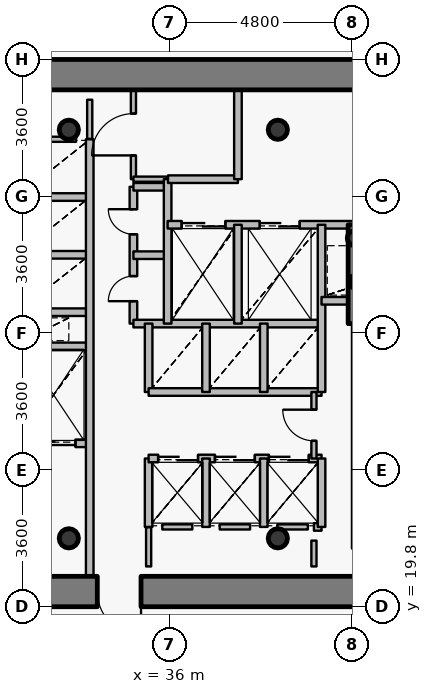
"""IFC4 building model, lengths in metres.
Left out: names, types, materials, properties, quantities, classifications, styles, units other than length and angle.
Written with IfcOpenShell. Run it as: python <this file> out.ifc"""

import sys

from ifc_helpers import new_model, si_unit, direction, frame, frame_2d, origin, origin_2d, place, context, subcontext, project, spatial, rectangle, hollow_circle, extrude, source, transform, mapped, element, fill, save


model = new_model("IFC4")
c1 = context("Model", 3, precision=1e-05, world=origin(), true_north=direction((0.0, 1.0)))
c2 = subcontext(c1, "Body", "Model", "MODEL_VIEW")
j1 = project(units=[si_unit("LENGTHUNIT", "METRE"), si_unit("PLANEANGLEUNIT", "RADIAN")], contexts=[c1])
p1 = place(None, origin())
s1 = spatial("IfcSite", under=j1, at=p1, CompositionType="ELEMENT")
p2 = place(p1, origin())
s2 = spatial("IfcBuilding", under=s1, at=p2, CompositionType="ELEMENT")
p3 = place(p2, frame((0.0, 0.0, 112.2)))
s3 = spatial("IfcBuildingStorey", under=s2, at=p3, CompositionType="ELEMENT", Elevation=112.2)
for number, where, z_axis, x_axis in (
    (1, (33.35, 21.6, 0.0), (0.0, 0.0, 1.0), (1.0, 0.0, 0.0)),
    (2, (38.85, 21.6, 0.0), (0.0, 0.0, 1.0), (1.0, 0.0, 0.0)),
    (3, (38.85, 32.35, 0.0), (0.0, 0.0, 1.0), (1.0, 0.0, 0.0)),
    (4, (33.35, 32.35, 0.0), (0.0, 0.0, 1.0), (1.0, 0.0, 0.0)),
):
    element("IfcColumn", number, at=place(p3, frame(where, z_axis=z_axis, x_axis=x_axis)), inside=s3, PredefinedType="COLUMN", context=c2, shape_type="SweptSolid", body=[
        extrude(hollow_circle(Radius=0.254, WallThickness=0.02, at=origin_2d()), origin(), (0.0, 0.0, 1.0), 3.75),
    ])
for number, where, z_axis, x_axis in (
    (5, (40.95, 28.35, 0.0), (0.0, 0.0, 1.0), (1.0, 0.0, 0.0)),
    (6, (40.88, 29.5, 0.0), (0.0, 0.0, 1.0), (1.0, 0.0, 0.0)),
):
    element("IfcColumn", number, at=place(p3, frame(where, z_axis=z_axis, x_axis=x_axis)), inside=s3, PredefinedType="COLUMN", context=c2, shape_type="SweptSolid", body=[
        extrude(hollow_circle(Radius=0.203, WallThickness=0.016, at=origin_2d()), origin(), (0.0, 0.0, 1.0), 3.75),
    ])
p4 = place(p3, frame((26.6, 33.8, 0.0), z_axis=(0.0, 0.0, 1.0), x_axis=(1.0, 0.0, 0.0)))
e7 = element("IfcWall", 7, at=p4, inside=s3, PredefinedType="SHEAR", context=c2, shape_type="SweptSolid", body=[
    extrude(rectangle(XDim=18.8, YDim=0.8, at=frame_2d((9.4, 0.0))), origin(), (0.0, 0.0, 1.0), 2.95),
])
p5 = place(p3, frame((45.4, 20.2, 0.0), z_axis=(0.0, 0.0, 1.0), x_axis=(-1.0, 0.0, 0.0)))
e8 = element("IfcWall", 8, at=p5, inside=s3, PredefinedType="SHEAR", context=c2, shape_type="SweptSolid", body=[
    extrude(rectangle(XDim=18.8, YDim=0.8, at=frame_2d((9.4, 0.0))), origin(), (0.0, 0.0, 1.0), 2.95),
])
p6 = place(p5, frame((10.15, 0.0, 0.0)))
e9 = element("IfcOpeningElement", 9, at=p6, cuts=e8, PredefinedType="OPENING", context=c2, shape_type="SweptSolid", body=[
    extrude(rectangle(XDim=1.15, YDim=2.15, at=origin_2d()), frame((0.575, 0.41, 1.075), z_axis=(0.0, -1.0, 0.0), x_axis=(1.0, 0.0, 0.0)), (0.0, 0.0, 1.0), 0.82),
])
p7 = place(p3, frame((40.9, 27.25, 0.0), z_axis=(0.0, 0.0, 1.0), x_axis=(0.0, 1.0, 0.0)))
e10 = element("IfcWall", 10, at=p7, inside=s3, PredefinedType="SHEAR", context=c2, shape_type="SweptSolid", body=[
    extrude(rectangle(XDim=2.6, YDim=0.4, at=frame_2d((1.3, 0.0))), origin(), (0.0, 0.0, 1.0), 3.1),
])
p8 = place(p3, frame((32.0, 24.1, 0.0), z_axis=(0.0, 0.0, 1.0), x_axis=(1.0, 0.0, 0.0)))
e11 = element("IfcWall", 11, at=p8, inside=s3, PredefinedType="PARTITIONING", context=c2, shape_type="SweptSolid", body=[
    extrude(rectangle(XDim=1.9, YDim=0.2, at=frame_2d((0.95, 0.0))), origin(), (0.0, 0.0, 1.0), 3.085),
])
p9 = place(p8, frame((0.375, 0.0, 0.0)))
e12 = element("IfcOpeningElement", 12, at=p9, cuts=e11, PredefinedType="OPENING", context=c2, shape_type="SweptSolid", body=[
    extrude(rectangle(XDim=1.15, YDim=2.15, at=origin_2d()), frame((0.575, 0.11, 1.075), z_axis=(0.0, -1.0, 0.0), x_axis=(1.0, 0.0, 0.0)), (0.0, 0.0, 1.0), 0.22),
])
for number, where, z_axis, x_axis in (
    (13, (32.0, 26.65, 0.0), (0.0, 0.0, 1.0), (1.0, 0.0, 0.0)),
    (14, (32.0, 27.55, 0.0), (0.0, 0.0, 1.0), (1.0, 0.0, 0.0)),
    (15, (32.0, 29.06, 0.0), (0.0, 0.0, 1.0), (1.0, 0.0, 0.0)),
    (16, (32.0, 30.58, 0.0), (0.0, 0.0, 1.0), (1.0, 0.0, 0.0)),
):
    element("IfcWall", number, at=place(p3, frame(where, z_axis=z_axis, x_axis=x_axis)), inside=s3, PredefinedType="PARTITIONING", context=c2, shape_type="SweptSolid", body=[
        extrude(rectangle(XDim=1.9, YDim=0.2, at=frame_2d((0.95, 0.0))), origin(), (0.0, 0.0, 1.0), 3.085),
    ])
p10 = place(p3, frame((33.9, 20.6, 0.0), z_axis=(0.0, 0.0, 1.0), x_axis=(0.0, 1.0, 0.0)))
e17 = element("IfcWall", 17, at=p10, inside=s3, PredefinedType="PARTITIONING", context=c2, shape_type="SweptSolid", body=[
    extrude(rectangle(XDim=11.5, YDim=0.2, at=frame_2d((5.75, 0.0))), origin(), (0.0, 0.0, 1.0), 3.085),
])
p11 = place(p3, frame((35.05, 27.25, 0.0), z_axis=(0.0, 0.0, 1.0), x_axis=(0.0, 1.0, 0.0)))
e18 = element("IfcWall", 18, at=p11, inside=s3, PredefinedType="PARTITIONING", context=c2, shape_type="SweptSolid", body=[
    extrude(rectangle(XDim=3.6, YDim=0.2, at=frame_2d((1.8, 0.0))), origin(), (0.0, 0.0, 1.0), 3.5),
])
p12 = place(p11, frame((0.59, 0.0, 0.0)))
e19 = element("IfcOpeningElement", 19, at=p12, cuts=e18, PredefinedType="OPENING", context=c2, shape_type="SweptSolid", body=[
    extrude(rectangle(XDim=0.66, YDim=2.05, at=origin_2d()), frame((0.33, 0.11, 1.025), z_axis=(0.0, -1.0, 0.0), x_axis=(1.0, 0.0, 0.0)), (0.0, 0.0, 1.0), 0.22),
])
p13 = place(p11, frame((2.35, 0.0, 0.0)))
e20 = element("IfcOpeningElement", 20, at=p13, cuts=e18, PredefinedType="OPENING", context=c2, shape_type="SweptSolid", body=[
    extrude(rectangle(XDim=0.66, YDim=2.05, at=origin_2d()), frame((0.33, 0.11, 1.025), z_axis=(0.0, -1.0, 0.0), x_axis=(1.0, 0.0, 0.0)), (0.0, 0.0, 1.0), 0.22),
])
p14 = place(p3, frame((35.05, 27.25, 0.0), z_axis=(0.0, 0.0, 1.0), x_axis=(1.0, 0.0, 0.0)))
e21 = element("IfcWall", 21, at=p14, inside=s3, PredefinedType="PARTITIONING", context=c2, shape_type="SweptSolid", body=[
    extrude(rectangle(XDim=4.95, YDim=0.2, at=frame_2d((2.475, 0.0))), origin(), (0.0, 0.0, 1.0), 3.085),
])
for number, where, z_axis, x_axis in (
    (22, (35.05, 29.05, 0.0), (0.0, 0.0, 1.0), (1.0, 0.0, 0.0)),
    (23, (35.05, 30.85, 0.0), (0.0, 0.0, 1.0), (1.0, 0.0, 0.0)),
):
    element("IfcWall", number, at=place(p3, frame(where, z_axis=z_axis, x_axis=x_axis)), inside=s3, PredefinedType="PARTITIONING", context=c2, shape_type="SweptSolid", body=[
        extrude(rectangle(XDim=0.9, YDim=0.2, at=frame_2d((0.45, 0.0))), origin(), (0.0, 0.0, 1.0), 3.5),
    ])
p15 = place(p3, frame((35.05, 31.05, 0.0), z_axis=(0.0, 0.0, 1.0), x_axis=(0.0, 1.0, 0.0)))
e24 = element("IfcWall", 24, at=p15, inside=s3, PredefinedType="PARTITIONING", context=c2, shape_type="SweptSolid", body=[
    extrude(rectangle(XDim=2.35, YDim=0.135, at=frame_2d((1.175, 0.0))), origin(), (0.0, 0.0, 1.0), 3.085),
])
p16 = place(p15, frame((0.625, 0.0, 0.0)))
e25 = element("IfcOpeningElement", 25, at=p16, cuts=e24, PredefinedType="OPENING", context=c2, shape_type="SweptSolid", body=[
    extrude(rectangle(XDim=1.1, YDim=2.15, at=origin_2d()), frame((0.55, 0.078, 1.075), z_axis=(0.0, -1.0, 0.0), x_axis=(1.0, 0.0, 0.0)), (0.0, 0.0, 1.0), 0.155),
])
p17 = place(p3, frame((35.05, 31.05, 0.0), z_axis=(0.0, 0.0, 1.0), x_axis=(1.0, 0.0, 0.0)))
e26 = element("IfcWall", 26, at=p17, inside=s3, PredefinedType="PARTITIONING", context=c2, shape_type="SweptSolid", body=[
    extrude(rectangle(XDim=0.9, YDim=0.135, at=frame_2d((0.45, 0.0))), origin(), (0.0, 0.0, 1.0), 3.5),
])
p18 = place(p3, frame((35.45, 21.9, 0.0), z_axis=(0.0, 0.0, 1.0), x_axis=(0.0, 1.0, 0.0)))
e27 = element("IfcWall", 27, at=p18, inside=s3, PredefinedType="PARTITIONING", context=c2, shape_type="SweptSolid", body=[
    extrude(rectangle(XDim=1.8, YDim=0.2, at=frame_2d((0.9, 0.0))), origin(), (0.0, 0.0, 1.0), 3.5),
])
p19 = place(p3, frame((35.45, 23.7, 0.0), z_axis=(0.0, 0.0, 1.0), x_axis=(1.0, 0.0, 0.0)))
e28 = element("IfcWall", 28, at=p19, inside=s3, PredefinedType="PARTITIONING", context=c2, shape_type="SweptSolid", body=[
    extrude(rectangle(XDim=4.55, YDim=0.2, at=frame_2d((2.275, 0.0))), origin(), (0.0, 0.0, 1.0), 3.085),
])
p20 = place(p19, frame((0.25, 0.0, 0.0)))
e29 = element("IfcOpeningElement", 29, at=p20, cuts=e28, PredefinedType="OPENING", context=c2, shape_type="SweptSolid", body=[
    extrude(rectangle(XDim=1.05, YDim=2.15, at=origin_2d()), frame((0.525, 0.11, 1.075), z_axis=(0.0, -1.0, 0.0), x_axis=(1.0, 0.0, 0.0)), (0.0, 0.0, 1.0), 0.22),
])
p21 = place(p19, frame((1.745, 0.0, 0.0)))
e30 = element("IfcOpeningElement", 30, at=p21, cuts=e28, PredefinedType="OPENING", context=c2, shape_type="SweptSolid", body=[
    extrude(rectangle(XDim=1.05, YDim=2.15, at=origin_2d()), frame((0.525, 0.11, 1.075), z_axis=(0.0, -1.0, 0.0), x_axis=(1.0, 0.0, 0.0)), (0.0, 0.0, 1.0), 0.22),
])
p22 = place(p19, frame((3.165, 0.0, 0.0)))
e31 = element("IfcOpeningElement", 31, at=p22, cuts=e28, PredefinedType="OPENING", context=c2, shape_type="SweptSolid", body=[
    extrude(rectangle(XDim=1.05, YDim=2.15, at=origin_2d()), frame((0.525, 0.11, 1.075), z_axis=(0.0, -1.0, 0.0), x_axis=(1.0, 0.0, 0.0)), (0.0, 0.0, 1.0), 0.22),
])
p23 = place(p3, frame((35.45, 25.45, 0.0), z_axis=(0.0, 0.0, 1.0), x_axis=(0.0, 1.0, 0.0)))
e32 = element("IfcWall", 32, at=p23, inside=s3, PredefinedType="PARTITIONING", context=c2, shape_type="SweptSolid", body=[
    extrude(rectangle(XDim=1.8, YDim=0.2, at=frame_2d((0.9, 0.0))), origin(), (0.0, 0.0, 1.0), 3.5),
])
p24 = place(p3, frame((35.45, 25.45, 0.0), z_axis=(0.0, 0.0, 1.0), x_axis=(1.0, 0.0, 0.0)))
e33 = element("IfcWall", 33, at=p24, inside=s3, PredefinedType="PARTITIONING", context=c2, shape_type="SweptSolid", body=[
    extrude(rectangle(XDim=4.55, YDim=0.2, at=frame_2d((2.275, 0.0))), origin(), (0.0, 0.0, 1.0), 3.085),
])
p25 = place(p3, frame((35.95, 27.25, 0.0), z_axis=(0.0, 0.0, 1.0), x_axis=(0.0, 1.0, 0.0)))
e34 = element("IfcWall", 34, at=p25, inside=s3, PredefinedType="PARTITIONING", context=c2, shape_type="SweptSolid", body=[
    extrude(rectangle(XDim=3.8, YDim=0.2, at=frame_2d((1.9, 0.0))), origin(), (0.0, 0.0, 1.0), 3.5),
])
p26 = place(p3, frame((35.95, 29.85, 0.0), z_axis=(0.0, 0.0, 1.0), x_axis=(1.0, 0.0, 0.0)))
e35 = element("IfcWall", 35, at=p26, inside=s3, PredefinedType="PARTITIONING", context=c2, shape_type="SweptSolid", body=[
    extrude(rectangle(XDim=8.49, YDim=0.2, at=frame_2d((4.245, 0.0))), origin(), (0.0, 0.0, 1.0), 3.085),
])
p27 = place(p26, frame((6.1, 0.0, 0.0)))
e36 = element("IfcOpeningElement", 36, at=p27, cuts=e35, PredefinedType="OPENING", context=c2, shape_type="SweptSolid", body=[
    extrude(rectangle(XDim=1.2, YDim=2.15, at=origin_2d()), frame((0.6, 0.11, 1.075), z_axis=(0.0, -1.0, 0.0), x_axis=(1.0, 0.0, 0.0)), (0.0, 0.0, 1.0), 0.22),
])
p28 = place(p26, frame((0.37, 0.0, 0.0)))
e37 = element("IfcOpeningElement", 37, at=p28, cuts=e35, PredefinedType="OPENING", context=c2, shape_type="SweptSolid", body=[
    extrude(rectangle(XDim=1.15, YDim=2.15, at=origin_2d()), frame((0.575, 0.11, 1.075), z_axis=(0.0, -1.0, 0.0), x_axis=(1.0, 0.0, 0.0)), (0.0, 0.0, 1.0), 0.22),
])
p29 = place(p26, frame((2.425, 0.0, 0.0)))
e38 = element("IfcOpeningElement", 38, at=p29, cuts=e35, PredefinedType="OPENING", context=c2, shape_type="SweptSolid", body=[
    extrude(rectangle(XDim=1.05, YDim=2.15, at=origin_2d()), frame((0.525, 0.11, 1.075), z_axis=(0.0, -1.0, 0.0), x_axis=(1.0, 0.0, 0.0)), (0.0, 0.0, 1.0), 0.22),
])
p30 = place(p3, frame((35.96, 31.05, 0.0), z_axis=(0.0, 0.0, 1.0), x_axis=(1.0, 0.0, 0.0)))
e39 = element("IfcWall", 39, at=p30, inside=s3, PredefinedType="PARTITIONING", context=c2, shape_type="SweptSolid", body=[
    extrude(rectangle(XDim=1.84, YDim=0.2, at=frame_2d((0.92, 0.0))), origin(), (0.0, 0.0, 1.0), 3.5),
])
for number, where, z_axis, x_axis in (
    (40, (36.96, 21.9, 0.0), (0.0, 0.0, 1.0), (0.0, 1.0, 0.0)),
    (41, (36.96, 25.45, 0.0), (0.0, 0.0, 1.0), (0.0, 1.0, 0.0)),
):
    element("IfcWall", number, at=place(p3, frame(where, z_axis=z_axis, x_axis=x_axis)), inside=s3, PredefinedType="PARTITIONING", context=c2, shape_type="SweptSolid", body=[
        extrude(rectangle(XDim=1.8, YDim=0.2, at=frame_2d((0.9, 0.0))), origin(), (0.0, 0.0, 1.0), 3.5),
    ])
p31 = place(p3, frame((37.8, 27.25, 0.0), z_axis=(0.0, 0.0, 1.0), x_axis=(0.0, 1.0, 0.0)))
e42 = element("IfcWall", 42, at=p31, inside=s3, PredefinedType="PARTITIONING", context=c2, shape_type="SweptSolid", body=[
    extrude(rectangle(XDim=2.6, YDim=0.2, at=frame_2d((1.3, 0.0))), origin(), (0.0, 0.0, 1.0), 3.5),
])
p32 = place(p3, frame((37.8, 31.05, 0.0), z_axis=(0.0, 0.0, 1.0), x_axis=(0.0, 1.0, 0.0)))
e43 = element("IfcWall", 43, at=p32, inside=s3, PredefinedType="PARTITIONING", context=c2, shape_type="SweptSolid", body=[
    extrude(rectangle(XDim=2.35, YDim=0.2, at=frame_2d((1.175, 0.0))), origin(), (0.0, 0.0, 1.0), 3.085),
])
for number, where, z_axis, x_axis in (
    (44, (38.48, 21.9, 0.0), (0.0, 0.0, 1.0), (0.0, 1.0, 0.0)),
    (45, (38.48, 25.45, 0.0), (0.0, 0.0, 1.0), (0.0, 1.0, 0.0)),
):
    element("IfcWall", number, at=place(p3, frame(where, z_axis=z_axis, x_axis=x_axis)), inside=s3, PredefinedType="PARTITIONING", context=c2, shape_type="SweptSolid", body=[
        extrude(rectangle(XDim=1.8, YDim=0.2, at=frame_2d((0.9, 0.0))), origin(), (0.0, 0.0, 1.0), 3.5),
    ])
p33 = place(p3, frame((39.8, 21.9, 0.0), z_axis=(0.0, 0.0, 1.0), x_axis=(1.0, 0.0, 0.0)))
e46 = element("IfcWall", 46, at=p33, inside=s3, PredefinedType="PARTITIONING", context=c2, shape_type="SweptSolid", body=[
    extrude(rectangle(XDim=0.2, YDim=0.2, at=frame_2d((0.1, 0.0))), origin(), (0.0, 0.0, 1.0), 3.5),
])
p34 = place(p3, frame((39.8, 23.7, 0.0), z_axis=(0.0, 0.0, 1.0), x_axis=(0.0, 1.0, 0.0)))
e47 = element("IfcWall", 47, at=p34, inside=s3, PredefinedType="PARTITIONING", context=c2, shape_type="SweptSolid", body=[
    extrude(rectangle(XDim=1.75, YDim=0.135, at=frame_2d((0.875, 0.0))), origin(), (0.0, 0.0, 1.0), 3.5),
])
p35 = place(p34, frame((0.465, 0.0, 0.0)))
e48 = element("IfcOpeningElement", 48, at=p35, cuts=e47, PredefinedType="OPENING", context=c2, shape_type="SweptSolid", body=[
    extrude(rectangle(XDim=0.82, YDim=2.1, at=origin_2d()), frame((0.41, 0.078, 1.05), z_axis=(0.0, -1.0, 0.0), x_axis=(1.0, 0.0, 0.0)), (0.0, 0.0, 1.0), 0.155),
])
p36 = place(p3, frame((40.0, 21.9, 0.0), z_axis=(0.0, 0.0, 1.0), x_axis=(0.0, 1.0, 0.0)))
e49 = element("IfcWall", 49, at=p36, inside=s3, PredefinedType="PARTITIONING", context=c2, shape_type="SweptSolid", body=[
    extrude(rectangle(XDim=1.8, YDim=0.2, at=frame_2d((0.9, 0.0))), origin(), (0.0, 0.0, 1.0), 3.5),
])
p37 = place(p3, frame((40.0, 25.45, 0.0), z_axis=(0.0, 0.0, 1.0), x_axis=(0.0, 1.0, 0.0)))
e50 = element("IfcWall", 50, at=p37, inside=s3, PredefinedType="PARTITIONING", context=c2, shape_type="SweptSolid", body=[
    extrude(rectangle(XDim=4.4, YDim=0.2, at=frame_2d((2.2, 0.0))), origin(), (0.0, 0.0, 1.0), 3.5),
])
p38 = place(p3, frame((40.0, 27.85, 0.0), z_axis=(0.0, 0.0, 1.0), x_axis=(1.0, 0.0, 0.0)))
e51 = element("IfcWall", 51, at=p38, inside=s3, PredefinedType="PARTITIONING", context=c2, shape_type="SweptSolid", body=[
    extrude(rectangle(XDim=0.9, YDim=0.2, at=frame_2d((0.45, 0.0))), origin(), (0.0, 0.0, 1.0), 3.5),
])
p39 = place(p3, frame((40.9, 21.33, 0.0), z_axis=(0.0, 0.0, 1.0), x_axis=(0.0, 1.0, 0.0)))
e52 = element("IfcWall", 52, at=p39, inside=s3, PredefinedType="PARTITIONING", context=c2, shape_type="SweptSolid", body=[
    extrude(rectangle(XDim=5.91, YDim=0.2, at=frame_2d((2.955, 0.0))), origin(), (0.0, 0.0, 1.0), 3.035),
])
p40 = place(p3, frame((36.6, 21.9, 0.0), z_axis=(0.0, 0.0, 1.0), x_axis=(-1.0, 0.0, 0.0)))
e53 = element("IfcWall", 53, at=p40, inside=s3, PredefinedType="PARTITIONING", context=c2, shape_type="SweptSolid", body=[
    extrude(rectangle(XDim=0.79, YDim=0.135, at=frame_2d((0.395, 0.0))), origin(), (0.0, 0.0, 1.0), 3.5),
])
p41 = place(p3, frame((38.12, 21.9, 0.0), z_axis=(0.0, 0.0, 1.0), x_axis=(-1.0, 0.0, 0.0)))
e54 = element("IfcWall", 54, at=p41, inside=s3, PredefinedType="PARTITIONING", context=c2, shape_type="SweptSolid", body=[
    extrude(rectangle(XDim=0.8, YDim=0.135, at=frame_2d((0.4, 0.0))), origin(), (0.0, 0.0, 1.0), 3.5),
])
p42 = place(p3, frame((39.64, 21.9, 0.0), z_axis=(0.0, 0.0, 1.0), x_axis=(-1.0, 0.0, 0.0)))
e55 = element("IfcWall", 55, at=p42, inside=s3, PredefinedType="PARTITIONING", context=c2, shape_type="SweptSolid", body=[
    extrude(rectangle(XDim=0.8, YDim=0.135, at=frame_2d((0.4, 0.0))), origin(), (0.0, 0.0, 1.0), 3.085),
])
p43 = place(p3, frame((32.36, 32.1, 0.0), z_axis=(0.0, 0.0, 1.0), x_axis=(1.0, 0.0, 0.0)))
e56 = element("IfcWall", 56, at=p43, inside=s3, PredefinedType="PARTITIONING", context=c2, shape_type="SweptSolid", body=[
    extrude(rectangle(XDim=1.18, YDim=0.135, at=frame_2d((0.59, 0.0))), origin(), (0.0, 0.0, 1.0), 3.085),
])
p44 = place(p3, frame((39.8, 20.86, 0.0), z_axis=(0.0, 0.0, 1.0), x_axis=(0.0, 1.0, 0.0)))
e57 = element("IfcWall", 57, at=p44, inside=s3, PredefinedType="PARTITIONING", context=c2, shape_type="SweptSolid", body=[
    extrude(rectangle(XDim=0.68, YDim=0.135, at=frame_2d((0.34, 0.0))), origin(), (0.0, 0.0, 1.0), 3.035),
])
for number, where, z_axis, x_axis in (
    (58, (35.45, 21.89, 0.0), (0.0, 0.0, 1.0), (0.0, -1.0, 0.0)),
    (59, (33.9, 32.11, 0.0), (0.0, 0.0, 1.0), (0.0, 1.0, 0.0)),
):
    element("IfcWall", number, at=place(p3, frame(where, z_axis=z_axis, x_axis=x_axis)), inside=s3, PredefinedType="PARTITIONING", context=c2, shape_type="SweptSolid", body=[
        extrude(rectangle(XDim=1.03, YDim=0.135, at=frame_2d((0.515, 0.0))), origin(), (0.0, 0.0, 1.0), 3.085),
    ])
m1 = source(origin(), c2, "Body", "SweptSolid", [
    extrude(rectangle(XDim=1.15, YDim=2.15, at=origin_2d()), frame((0.575, 0.025, 1.075), z_axis=(0.0, -1.0, 0.0), x_axis=(1.0, 0.0, 0.0)), (0.0, 0.0, 1.0), 0.05),
])
p45 = place(p6, origin())
e60 = element("IfcDoor", 60, at=p45, inside=s3, OperationType="SINGLE_SWING_LEFT", PredefinedType="DOOR", context=c2, shape_type="MappedRepresentation", body=[
    mapped(m1, transform((0.0, 0.0, 0.0), x_axis=(1.0, 0.0, 0.0), y_axis=(0.0, 1.0, 0.0), z_axis=(0.0, 0.0, 1.0), scale=1.0)),
])
fill(e9, e60)
m2 = source(origin(), c2, "Body", "SweptSolid", [
    extrude(rectangle(XDim=1.15, YDim=2.15, at=origin_2d()), frame((0.575, 0.025, 1.075), z_axis=(0.0, -1.0, 0.0), x_axis=(1.0, 0.0, 0.0)), (0.0, 0.0, 1.0), 0.05),
])
p46 = place(p28, origin())
e61 = element("IfcDoor", 61, at=p46, inside=s3, OperationType="DOUBLE_DOOR_SLIDING", PredefinedType="USERDEFINED", context=c2, shape_type="MappedRepresentation", body=[
    mapped(m2, transform((0.0, 0.0, 0.0), x_axis=(1.0, 0.0, 0.0), y_axis=(0.0, 1.0, 0.0), z_axis=(0.0, 0.0, 1.0), scale=1.0)),
])
fill(e37, e61)
p47 = place(p9, origin())
e62 = element("IfcDoor", 62, at=p47, inside=s3, OperationType="DOUBLE_DOOR_SLIDING", PredefinedType="USERDEFINED", context=c2, shape_type="MappedRepresentation", body=[
    mapped(m2, transform((0.0, 0.0, 0.0), x_axis=(1.0, 0.0, 0.0), y_axis=(0.0, 1.0, 0.0), z_axis=(0.0, 0.0, 1.0), scale=1.0)),
])
fill(e12, e62)
m3 = source(origin(), c2, "Body", "SweptSolid", [
    extrude(rectangle(XDim=1.05, YDim=2.15, at=origin_2d()), frame((0.525, 0.025, 1.075), z_axis=(0.0, -1.0, 0.0), x_axis=(1.0, 0.0, 0.0)), (0.0, 0.0, 1.0), 0.05),
])
p48 = place(p29, origin())
e63 = element("IfcDoor", 63, at=p48, inside=s3, OperationType="DOUBLE_DOOR_SLIDING", PredefinedType="USERDEFINED", context=c2, shape_type="MappedRepresentation", body=[
    mapped(m3, transform((0.0, 0.0, 0.0), x_axis=(1.0, 0.0, 0.0), y_axis=(0.0, 1.0, 0.0), z_axis=(0.0, 0.0, 1.0), scale=1.0)),
])
fill(e38, e63)
p49 = place(p20, origin())
e64 = element("IfcDoor", 64, at=p49, inside=s3, OperationType="DOUBLE_DOOR_SLIDING", PredefinedType="USERDEFINED", context=c2, shape_type="MappedRepresentation", body=[
    mapped(m3, transform((0.0, 0.0, 0.0), x_axis=(1.0, 0.0, 0.0), y_axis=(0.0, 1.0, 0.0), z_axis=(0.0, 0.0, 1.0), scale=1.0)),
])
fill(e29, e64)
p50 = place(p21, origin())
e65 = element("IfcDoor", 65, at=p50, inside=s3, OperationType="DOUBLE_DOOR_SLIDING", PredefinedType="USERDEFINED", context=c2, shape_type="MappedRepresentation", body=[
    mapped(m3, transform((0.0, 0.0, 0.0), x_axis=(1.0, 0.0, 0.0), y_axis=(0.0, 1.0, 0.0), z_axis=(0.0, 0.0, 1.0), scale=1.0)),
])
fill(e30, e65)
p51 = place(p22, origin())
e66 = element("IfcDoor", 66, at=p51, inside=s3, OperationType="DOUBLE_DOOR_SLIDING", PredefinedType="USERDEFINED", context=c2, shape_type="MappedRepresentation", body=[
    mapped(m3, transform((0.0, 0.0, 0.0), x_axis=(1.0, 0.0, 0.0), y_axis=(0.0, 1.0, 0.0), z_axis=(0.0, 0.0, 1.0), scale=1.0)),
])
fill(e31, e66)
m4 = source(origin(), c2, "Body", "SweptSolid", [
    extrude(rectangle(XDim=0.66, YDim=2.05, at=origin_2d()), frame((0.33, 0.025, 1.025), z_axis=(0.0, -1.0, 0.0), x_axis=(1.0, 0.0, 0.0)), (0.0, 0.0, 1.0), 0.05),
])
p52 = place(p12, origin())
e67 = element("IfcDoor", 67, at=p52, inside=s3, OperationType="SINGLE_SWING_LEFT", PredefinedType="USERDEFINED", context=c2, shape_type="MappedRepresentation", body=[
    mapped(m4, transform((0.0, 0.0, 0.0), x_axis=(1.0, 0.0, 0.0), y_axis=(0.0, 1.0, 0.0), z_axis=(0.0, 0.0, 1.0), scale=1.0)),
])
fill(e19, e67)
p53 = place(p13, origin())
e68 = element("IfcDoor", 68, at=p53, inside=s3, OperationType="SINGLE_SWING_RIGHT", PredefinedType="USERDEFINED", context=c2, shape_type="MappedRepresentation", body=[
    mapped(m4, transform((0.0, 0.0, 0.0), x_axis=(1.0, 0.0, 0.0), y_axis=(0.0, 1.0, 0.0), z_axis=(0.0, 0.0, 1.0), scale=1.0)),
])
fill(e20, e68)
m5 = source(origin(), c2, "Body", "SweptSolid", [
    extrude(rectangle(XDim=1.1, YDim=2.15, at=origin_2d()), frame((0.55, 0.025, 1.075), z_axis=(0.0, -1.0, 0.0), x_axis=(1.0, 0.0, 0.0)), (0.0, 0.0, 1.0), 0.05),
])
p54 = place(p16, origin())
e69 = element("IfcDoor", 69, at=p54, inside=s3, OperationType="SINGLE_SWING_LEFT", PredefinedType="DOOR", context=c2, shape_type="MappedRepresentation", body=[
    mapped(m5, transform((0.0, 0.0, 0.0), x_axis=(1.0, 0.0, 0.0), y_axis=(0.0, 1.0, 0.0), z_axis=(0.0, 0.0, 1.0), scale=1.0)),
])
fill(e25, e69)
m6 = source(origin(), c2, "Body", "SweptSolid", [
    extrude(rectangle(XDim=0.82, YDim=2.1, at=origin_2d()), frame((0.41, 0.025, 1.05), z_axis=(0.0, -1.0, 0.0), x_axis=(1.0, 0.0, 0.0)), (0.0, 0.0, 1.0), 0.05),
])
p55 = place(p35, origin())
e70 = element("IfcDoor", 70, at=p55, inside=s3, OperationType="SINGLE_SWING_RIGHT", PredefinedType="DOOR", context=c2, shape_type="MappedRepresentation", body=[
    mapped(m6, transform((0.0, 0.0, 0.0), x_axis=(1.0, 0.0, 0.0), y_axis=(0.0, 1.0, 0.0), z_axis=(0.0, 0.0, 1.0), scale=1.0)),
])
fill(e48, e70)
save(model, sys.argv[1])
